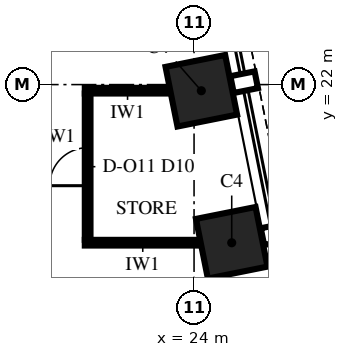
"""IFC4 building model, lengths in metres.
Left out: names, types, materials, properties, quantities, classifications, styles, units other than length and angle.
Written with IfcOpenShell. Run it as: python <this file> out.ifc"""

import sys

from ifc_helpers import new_model, si_unit, direction, frame, frame_2d, origin, origin_2d, place, context, subcontext, project, spatial, rectangle, extrude, element, fill, save


model = new_model("IFC4")
c1 = context("Model", 3, precision=1e-05, world=origin(), true_north=direction((0.0, 1.0)))
c2 = subcontext(c1, "Body", "Model", "MODEL_VIEW")
j1 = project(units=[si_unit("LENGTHUNIT", "METRE"), si_unit("PLANEANGLEUNIT", "RADIAN")], contexts=[c1])
p1 = place(None, origin())
s1 = spatial("IfcSite", under=j1, at=p1, CompositionType="ELEMENT")
p2 = place(p1, origin())
s2 = spatial("IfcBuilding", under=s1, at=p2, CompositionType="ELEMENT")
p3 = place(p2, frame((0.0, 0.0, 173.0)))
s3 = spatial("IfcBuildingStorey", under=s2, at=p3, CompositionType="ELEMENT", Elevation=173.0)
for number, where, z_axis, x_axis in (
    (1, (24.991, 17.838, 0.0), (0.0, 0.0, 1.0), (-0.196, 0.981, 0.0)),
    (2, (24.191, 21.838, 0.0), (0.0, 0.0, 1.0), (-0.196, 0.981, 0.0)),
):
    element("IfcColumn", number, at=place(p3, frame(where, z_axis=z_axis, x_axis=x_axis)), inside=s3, PredefinedType="COLUMN", context=c2, shape_type="SweptSolid", body=[
        extrude(rectangle(XDim=1.6, YDim=1.6, at=origin_2d()), origin(), (0.0, 0.0, 1.0), 5.0),
    ])
p4 = place(p3, frame((21.125, 17.84, 0.0), z_axis=(0.0, 0.0, 1.0), x_axis=(1.0, 0.0, 0.0)))
e3 = element("IfcWall", 3, at=p4, inside=s3, PredefinedType="PARTITIONING", context=c2, shape_type="SweptSolid", body=[
    extrude(rectangle(XDim=3.05, YDim=0.15, at=frame_2d((1.525, 0.0))), origin(), (0.0, 0.0, 1.0), 4.25),
])
p5 = place(p3, frame((21.125, 21.84, 0.0), z_axis=(0.0, 0.0, 1.0), x_axis=(1.0, 0.0, 0.0)))
e4 = element("IfcWall", 4, at=p5, inside=s3, PredefinedType="PARTITIONING", context=c2, shape_type="SweptSolid", body=[
    extrude(rectangle(XDim=2.25, YDim=0.15, at=frame_2d((1.125, 0.0))), origin(), (0.0, 0.0, 1.0), 4.25),
])
p6 = place(p3, frame((21.2, 17.915, 0.0), z_axis=(0.0, 0.0, 1.0), x_axis=(0.0, 1.0, 0.0)))
e5 = element("IfcWall", 5, at=p6, inside=s3, PredefinedType="PARTITIONING", context=c2, shape_type="SweptSolid", body=[
    extrude(rectangle(XDim=3.85, YDim=0.15, at=frame_2d((1.925, 0.0))), origin(), (0.0, 0.0, 1.0), 4.25),
])
p7 = place(p6, frame((1.425, 0.0, 0.0)))
e6 = element("IfcOpeningElement", 6, at=p7, cuts=e5, PredefinedType="OPENING", context=c2, shape_type="SweptSolid", body=[
    extrude(rectangle(XDim=1.0, YDim=2.3, at=frame_2d((0.5, 1.15))), frame((0.0, 0.09, 0.0), z_axis=(0.0, -1.0, 0.0), x_axis=(1.0, 0.0, 0.0)), (0.0, 0.0, 1.0), 0.18),
])
p8 = place(p7, origin())
e7 = element("IfcDoor", 7, at=p8, inside=s3, OperationType="SINGLE_SWING_LEFT", PredefinedType="DOOR", context=c2, shape_type="SweptSolid", body=[
    extrude(rectangle(XDim=1.0, YDim=2.3, at=frame_2d((0.5, 1.15))), frame((0.0, 0.075, 0.0), z_axis=(0.0, -1.0, 0.0), x_axis=(1.0, 0.0, 0.0)), (0.0, 0.0, 1.0), 0.149),
])
fill(e6, e7)
save(model, sys.argv[1])
